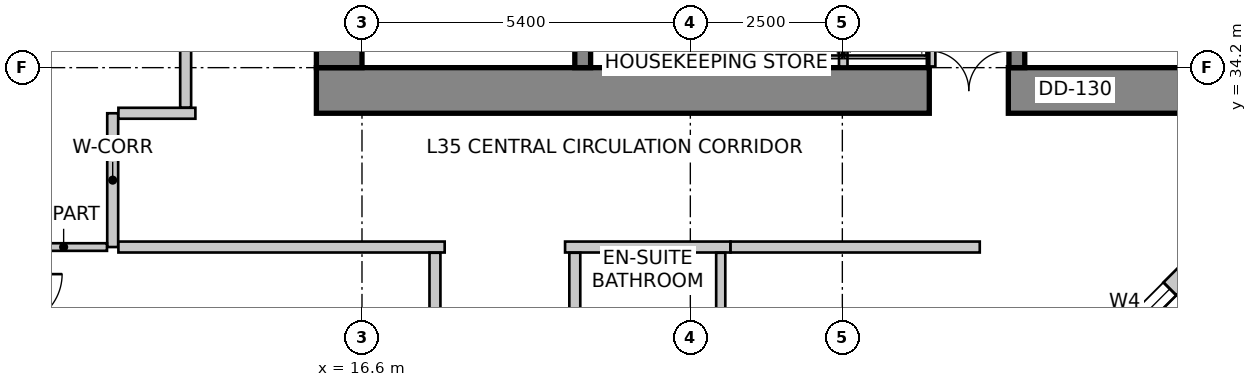
"""IFC4 building model, lengths in metres.
Left out: names, types, materials, properties, quantities, classifications, styles, units other than length and angle.
Written with IfcOpenShell. Run it as: python <this file> out.ifc"""

import sys

from ifc_helpers import new_model, si_unit, direction, frame, frame_2d, origin, place, context, subcontext, project, spatial, rectangle, extrude, source, transform, mapped, element, fill, save


model = new_model("IFC4")
c1 = context("Model", 3, precision=1e-05, world=origin(), true_north=direction((0.0, 1.0)))
c2 = subcontext(c1, "Body", "Model", "MODEL_VIEW")
j1 = project(units=[si_unit("LENGTHUNIT", "METRE"), si_unit("PLANEANGLEUNIT", "RADIAN")], contexts=[c1])
p1 = place(None, origin())
s1 = spatial("IfcSite", under=j1, at=p1, CompositionType="ELEMENT")
p2 = place(p1, origin())
s2 = spatial("IfcBuilding", under=s1, at=p2, CompositionType="ELEMENT")
p3 = place(p2, frame((0.0, 0.0, 143.0)))
s3 = spatial("IfcBuildingStorey", under=s2, at=p3, CompositionType="ELEMENT", Elevation=143.0)
p4 = place(p3, frame((15.85, 33.825, 0.0), z_axis=(0.0, 0.0, 1.0), x_axis=(1.0, 0.0, 0.0)))
e1 = element("IfcWall", 1, at=p4, inside=s3, PredefinedType="SHEAR", context=c2, shape_type="SweptSolid", body=[
    extrude(rectangle(XDim=15.9, YDim=0.75, at=frame_2d((7.95, 0.0))), origin(), (0.0, 0.0, 1.0), 3.6),
])
m1 = source(origin(), c2, "Body", "SweptSolid", [
    extrude(rectangle(XDim=1.3, YDim=2.15, at=frame_2d((0.65, 1.075))), frame((0.0, 0.385, 0.0), z_axis=(0.0, -1.0, 0.0), x_axis=(1.0, 0.0, 0.0)), (0.0, 0.0, 1.0), 0.77),
])
p5 = place(p4, frame((10.08, 0.0, 0.0)))
e2 = element("IfcOpeningElement", 2, at=p5, cuts=e1, PredefinedType="OPENING", context=c2, shape_type="MappedRepresentation", body=[
    mapped(m1, transform((0.0, 0.0, 0.0), scale=1.0)),
])
p6 = place(p3, frame((16.225, 34.2, 0.0), z_axis=(0.0, 0.0, 1.0), x_axis=(0.0, 1.0, 0.0)))
e3 = element("IfcWall", 3, at=p6, inside=s3, PredefinedType="SHEAR", context=c2, shape_type="SweptSolid", body=[
    extrude(rectangle(XDim=11.4, YDim=0.75, at=frame_2d((5.7, 0.0))), origin(), (0.0, 0.0, 1.0), 3.6),
])
m2 = source(origin(), c2, "Body", "SweptSolid", [
    extrude(rectangle(XDim=1.1, YDim=2.15, at=frame_2d((0.55, 1.075))), frame((0.0, 0.385, 0.0), z_axis=(0.0, -1.0, 0.0), x_axis=(1.0, 0.0, 0.0)), (0.0, 0.0, 1.0), 0.77),
])
p7 = place(p6, frame((7.15, 0.0, 0.0)))
e4 = element("IfcOpeningElement", 4, at=p7, cuts=e3, PredefinedType="OPENING", context=c2, shape_type="MappedRepresentation", body=[
    mapped(m2, transform((0.0, 0.0, 0.0), scale=1.0)),
])
p8 = place(p3, frame((20.23, 34.2, 0.0), z_axis=(0.0, 0.0, 1.0), x_axis=(0.0, 1.0, 0.0)))
e5 = element("IfcWall", 5, at=p8, inside=s3, PredefinedType="SHEAR", context=c2, shape_type="SweptSolid", body=[
    extrude(rectangle(XDim=9.06, YDim=0.26, at=frame_2d((4.53, 0.0))), origin(), (0.0, 0.0, 1.0), 3.6),
])
m3 = source(origin(), c2, "Body", "SweptSolid", [
    extrude(rectangle(XDim=1.1, YDim=2.15, at=frame_2d((0.55, 1.075))), frame((0.0, 0.14, 0.0), z_axis=(0.0, -1.0, 0.0), x_axis=(1.0, 0.0, 0.0)), (0.0, 0.0, 1.0), 0.28),
])
p9 = place(p8, frame((7.45, 0.0, 0.0)))
e6 = element("IfcOpeningElement", 6, at=p9, cuts=e5, PredefinedType="OPENING", context=c2, shape_type="MappedRepresentation", body=[
    mapped(m3, transform((0.0, 0.0, 0.0), scale=1.0)),
])
p10 = place(p3, frame((27.37, 34.2, 0.0), z_axis=(0.0, 0.0, 1.0), x_axis=(0.0, 1.0, 0.0)))
e7 = element("IfcWall", 7, at=p10, inside=s3, PredefinedType="SHEAR", context=c2, shape_type="SweptSolid", body=[
    extrude(rectangle(XDim=9.06, YDim=0.26, at=frame_2d((4.53, 0.0))), origin(), (0.0, 0.0, 1.0), 3.6),
])
p11 = place(p10, frame((7.45, 0.0, 0.0)))
e8 = element("IfcOpeningElement", 8, at=p11, cuts=e7, PredefinedType="OPENING", context=c2, shape_type="MappedRepresentation", body=[
    mapped(m3, transform((0.0, 0.0, 0.0), scale=1.0)),
])
p12 = place(p3, frame((28.116, 28.792, 0.0), z_axis=(0.0, 0.0, 1.0), x_axis=(0.707064797706, 0.707148762175, 0.0)))
e9 = element("IfcWall", 9, at=p12, inside=s3, PredefinedType="SOLIDWALL", context=c2, shape_type="SweptSolid", body=[
    extrude(rectangle(XDim=2.908, YDim=0.3, at=frame_2d((1.454, 0.0))), origin(), (0.0, 0.0, 1.0), 3.35),
])
m4 = source(origin(), c2, "Body", "SweptSolid", [
    extrude(rectangle(XDim=2.1, YDim=2.0, at=frame_2d((1.05, 1.0))), frame((0.0, 0.16, 0.0), z_axis=(0.0, -1.0, 0.0), x_axis=(1.0, 0.0, 0.0)), (0.0, 0.0, 1.0), 0.32),
])
p13 = place(p12, frame((0.404, 0.0, 0.85)))
e10 = element("IfcOpeningElement", 10, at=p13, cuts=e9, PredefinedType="OPENING", context=c2, shape_type="MappedRepresentation", body=[
    mapped(m4, transform((0.0, 0.0, 0.0), scale=1.0)),
])
p14 = place(p3, frame((13.269, 47.134, 0.0), z_axis=(0.0, 0.0, 1.0), x_axis=(-0.319929773322, -0.947441259468, 0.0)))
e11 = element("IfcWall", 11, at=p14, inside=s3, PredefinedType="SOLIDWALL", context=c2, shape_type="SweptSolid", body=[
    extrude(rectangle(XDim=16.134, YDim=0.3, at=frame_2d((8.067, 0.0))), origin(), (0.0, 0.0, 1.0), 3.35),
])
p15 = place(p14, frame((2.426, 0.0, 0.85)))
e12 = element("IfcOpeningElement", 12, at=p15, cuts=e11, PredefinedType="OPENING", context=c2, shape_type="MappedRepresentation", body=[
    mapped(m4, transform((0.0, 0.0, 0.0), scale=1.0)),
])
m5 = source(origin(), c2, "Body", "SweptSolid", [
    extrude(rectangle(XDim=2.4, YDim=2.2, at=frame_2d((1.2, 1.1))), frame((0.0, 0.16, 0.0), z_axis=(0.0, -1.0, 0.0), x_axis=(1.0, 0.0, 0.0)), (0.0, 0.0, 1.0), 0.32),
])
p16 = place(p14, frame((7.211, 0.0, 0.85)))
e13 = element("IfcOpeningElement", 13, at=p16, cuts=e11, PredefinedType="OPENING", context=c2, shape_type="MappedRepresentation", body=[
    mapped(m5, transform((0.0, 0.0, 0.0), scale=1.0)),
])
p17 = place(p14, frame((12.296, 0.0, 0.85)))
e14 = element("IfcOpeningElement", 14, at=p17, cuts=e11, PredefinedType="OPENING", context=c2, shape_type="MappedRepresentation", body=[
    mapped(m4, transform((0.0, 0.0, 0.0), scale=1.0)),
])
p18 = place(p3, frame((8.187, 31.834, 0.0), z_axis=(0.0, 0.0, 1.0), x_axis=(0.198869838988, -0.980025911464, 0.0)))
e15 = element("IfcWall", 15, at=p18, inside=s3, PredefinedType="SOLIDWALL", context=c2, shape_type="SweptSolid", body=[
    extrude(rectangle(XDim=16.363, YDim=0.3, at=frame_2d((8.182, 0.0))), origin(), (0.0, 0.0, 1.0), 3.35),
])
m6 = source(origin(), c2, "Body", "SweptSolid", [
    extrude(rectangle(XDim=1.5, YDim=1.8, at=frame_2d((0.75, 0.9))), frame((0.0, 0.16, 0.0), z_axis=(0.0, -1.0, 0.0), x_axis=(1.0, 0.0, 0.0)), (0.0, 0.0, 1.0), 0.32),
])
p19 = place(p18, frame((0.981, 0.0, 0.85)))
e16 = element("IfcOpeningElement", 16, at=p19, cuts=e15, PredefinedType="OPENING", context=c2, shape_type="MappedRepresentation", body=[
    mapped(m6, transform((0.0, 0.0, 0.0), scale=1.0)),
])
p20 = place(p18, frame((4.195, 0.0, 0.85)))
e17 = element("IfcOpeningElement", 17, at=p20, cuts=e15, PredefinedType="OPENING", context=c2, shape_type="MappedRepresentation", body=[
    mapped(m5, transform((0.0, 0.0, 0.0), scale=1.0)),
])
p21 = place(p18, frame((9.007, 0.0, 0.85)))
e18 = element("IfcOpeningElement", 18, at=p21, cuts=e15, PredefinedType="OPENING", context=c2, shape_type="MappedRepresentation", body=[
    mapped(m4, transform((0.0, 0.0, 0.0), scale=1.0)),
])
p22 = place(p18, frame((13.236, 0.0, 0.85)))
e19 = element("IfcOpeningElement", 19, at=p22, cuts=e15, PredefinedType="OPENING", context=c2, shape_type="MappedRepresentation", body=[
    mapped(m5, transform((0.0, 0.0, 0.0), scale=1.0)),
])
for number, where, z_axis, x_axis in (
    (20, (25.96, 34.22, 0.0), (0.0, 0.0, 1.0), (0.0, 1.0, 0.0)),
    (21, (23.07, 34.22, 0.0), (0.0, 0.0, 1.0), (0.0, 1.0, 0.0)),
    (22, (24.515, 34.22, 0.0), (0.0, 0.0, 1.0), (0.0, 1.0, 0.0)),
):
    element("IfcWall", number, at=place(p3, frame(where, z_axis=z_axis, x_axis=x_axis)), inside=s3, PredefinedType="SOLIDWALL", context=c2, shape_type="SweptSolid", body=[
        extrude(rectangle(XDim=1.62, YDim=0.14, at=frame_2d((0.81, 0.0))), origin(), (0.0, 0.0, 1.0), 2.642),
    ])
p23 = place(p3, frame((12.5, 31.25, 0.0), z_axis=(0.0, 0.0, 1.0), x_axis=(0.0, 1.0, 0.0)))
e23 = element("IfcWall", 23, at=p23, inside=s3, PredefinedType="PARTITIONING", context=c2, shape_type="SweptSolid", body=[
    extrude(rectangle(XDim=2.2, YDim=0.18, at=frame_2d((1.1, 0.0))), origin(), (0.0, 0.0, 1.0), 3.034),
])
p24 = place(p3, frame((12.594, 33.45, 0.0), z_axis=(0.0, 0.0, 1.0), x_axis=(1.0, 0.0, 0.0)))
e24 = element("IfcWall", 24, at=p24, inside=s3, PredefinedType="PARTITIONING", context=c2, shape_type="SweptSolid", body=[
    extrude(rectangle(XDim=1.266, YDim=0.18, at=frame_2d((0.633, 0.0))), origin(), (0.0, 0.0, 1.0), 3.35),
])
p25 = place(p3, frame((17.96, 31.25, 0.0), z_axis=(0.0, 0.0, 1.0), x_axis=(-1.0, 0.0, 0.0)))
e25 = element("IfcWall", 25, at=p25, inside=s3, PredefinedType="PARTITIONING", context=c2, shape_type="SweptSolid", body=[
    extrude(rectangle(XDim=5.366, YDim=0.18, at=frame_2d((2.683, 0.0))), origin(), (0.0, 0.0, 1.0), 3.034),
])
p26 = place(p3, frame((22.66, 31.25, 0.0), z_axis=(0.0, 0.0, 1.0), x_axis=(-1.0, 0.0, 0.0)))
e26 = element("IfcWall", 26, at=p26, inside=s3, PredefinedType="PARTITIONING", context=c2, shape_type="SweptSolid", body=[
    extrude(rectangle(XDim=2.72, YDim=0.18, at=frame_2d((1.36, 0.0))), origin(), (0.0, 0.0, 1.0), 3.034),
])
p27 = place(p3, frame((26.76, 31.25, 0.0), z_axis=(0.0, 0.0, 1.0), x_axis=(-1.0, 0.0, 0.0)))
e27 = element("IfcWall", 27, at=p27, inside=s3, PredefinedType="PARTITIONING", context=c2, shape_type="SweptSolid", body=[
    extrude(rectangle(XDim=4.098, YDim=0.18, at=frame_2d((2.049, 0.0))), origin(), (0.0, 0.0, 1.0), 3.35),
])
p28 = place(p3, frame((13.7, 33.544, 0.0), z_axis=(0.0, 0.0, 1.0), x_axis=(0.0, 1.0, 0.0)))
e28 = element("IfcWall", 28, at=p28, inside=s3, PredefinedType="PARTITIONING", context=c2, shape_type="SweptSolid", body=[
    extrude(rectangle(XDim=13.86, YDim=0.18, at=frame_2d((6.93, 0.0))), origin(), (0.0, 0.0, 1.0), 2.492),
])
m7 = source(origin(), c2, "Body", "SweptSolid", [
    extrude(rectangle(XDim=0.9, YDim=2.15, at=frame_2d((0.45, 1.075))), frame((0.0, 0.1, 0.0), z_axis=(0.0, -1.0, 0.0), x_axis=(1.0, 0.0, 0.0)), (0.0, 0.0, 1.0), 0.2),
])
p29 = place(p28, frame((4.253, 0.0, 0.0)))
e29 = element("IfcOpeningElement", 29, at=p29, cuts=e28, PredefinedType="OPENING", context=c2, shape_type="MappedRepresentation", body=[
    mapped(m7, transform((0.0, 0.0, 0.0), scale=1.0)),
])
p30 = place(p3, frame((12.406, 31.25, 0.0), z_axis=(0.0, 0.0, 1.0), x_axis=(-1.0, 0.0, 0.0)))
e30 = element("IfcWall", 30, at=p30, inside=s3, PredefinedType="PARTITIONING", context=c2, shape_type="SweptSolid", body=[
    extrude(rectangle(XDim=1.426, YDim=0.125, at=frame_2d((0.713, 0.0))), origin(), (0.0, 0.0, 1.0), 2.492),
])
p31 = place(p3, frame((17.8, 19.5, 0.0), z_axis=(0.0, 0.0, 1.0), x_axis=(0.0, 1.0, 0.0)))
e31 = element("IfcWall", 31, at=p31, inside=s3, PredefinedType="PARTITIONING", context=c2, shape_type="SweptSolid", body=[
    extrude(rectangle(XDim=11.656, YDim=0.18, at=frame_2d((5.828, 0.0))), origin(), (0.0, 0.0, 1.0), 2.803),
])
p32 = place(p31, frame((5.378, 0.0, 0.0)))
e32 = element("IfcOpeningElement", 32, at=p32, cuts=e31, PredefinedType="OPENING", context=c2, shape_type="MappedRepresentation", body=[
    mapped(m7, transform((0.0, 0.0, 0.0), scale=1.0)),
])
p33 = place(p3, frame((20.1, 31.156, 0.0), z_axis=(0.0, 0.0, 1.0), x_axis=(0.0, -1.0, 0.0)))
e33 = element("IfcWall", 33, at=p33, inside=s3, PredefinedType="PARTITIONING", context=c2, shape_type="SweptSolid", body=[
    extrude(rectangle(XDim=2.266, YDim=0.18, at=frame_2d((1.133, 0.0))), origin(), (0.0, 0.0, 1.0), 3.034),
])
p34 = place(p3, frame((22.5, 31.156, 0.0), z_axis=(0.0, 0.0, 1.0), x_axis=(0.0, -1.0, 0.0)))
e34 = element("IfcWall", 34, at=p34, inside=s3, PredefinedType="PARTITIONING", context=c2, shape_type="SweptSolid", body=[
    extrude(rectangle(XDim=2.027, YDim=0.15, at=frame_2d((1.014, 0.0))), origin(), (0.0, 0.0, 1.0), 3.034),
])
m8 = source(origin(), c2, "Body", "SweptSolid", [
    extrude(rectangle(XDim=2.1, YDim=2.0, at=frame_2d((1.05, 1.0))), frame((0.0, -0.015, 0.0), z_axis=(0.0, -1.0, 0.0), x_axis=(1.0, 0.0, 0.0)), (0.0, 0.0, 1.0), 0.06),
])
p35 = place(p13, origin())
e35 = element("IfcWindow", 35, at=p35, inside=s3, PartitioningType="SINGLE_PANEL", PredefinedType="WINDOW", context=c2, shape_type="MappedRepresentation", body=[
    mapped(m8, transform((0.0, 0.0, 0.0), scale=1.0)),
])
fill(e10, e35)
m9 = source(origin(), c2, "Body", "SweptSolid", [
    extrude(rectangle(XDim=1.3, YDim=2.15, at=frame_2d((0.65, 1.075))), frame((0.0, 0.025, 0.0), z_axis=(0.0, -1.0, 0.0), x_axis=(1.0, 0.0, 0.0)), (0.0, 0.0, 1.0), 0.05),
])
p36 = place(p5, origin())
e36 = element("IfcDoor", 36, at=p36, inside=s3, OperationType="DOUBLE_DOOR_SINGLE_SWING", PredefinedType="DOOR", context=c2, shape_type="MappedRepresentation", body=[
    mapped(m9, transform((0.0, 0.0, 0.0), scale=1.0)),
])
fill(e2, e36)
save(model, sys.argv[1])
